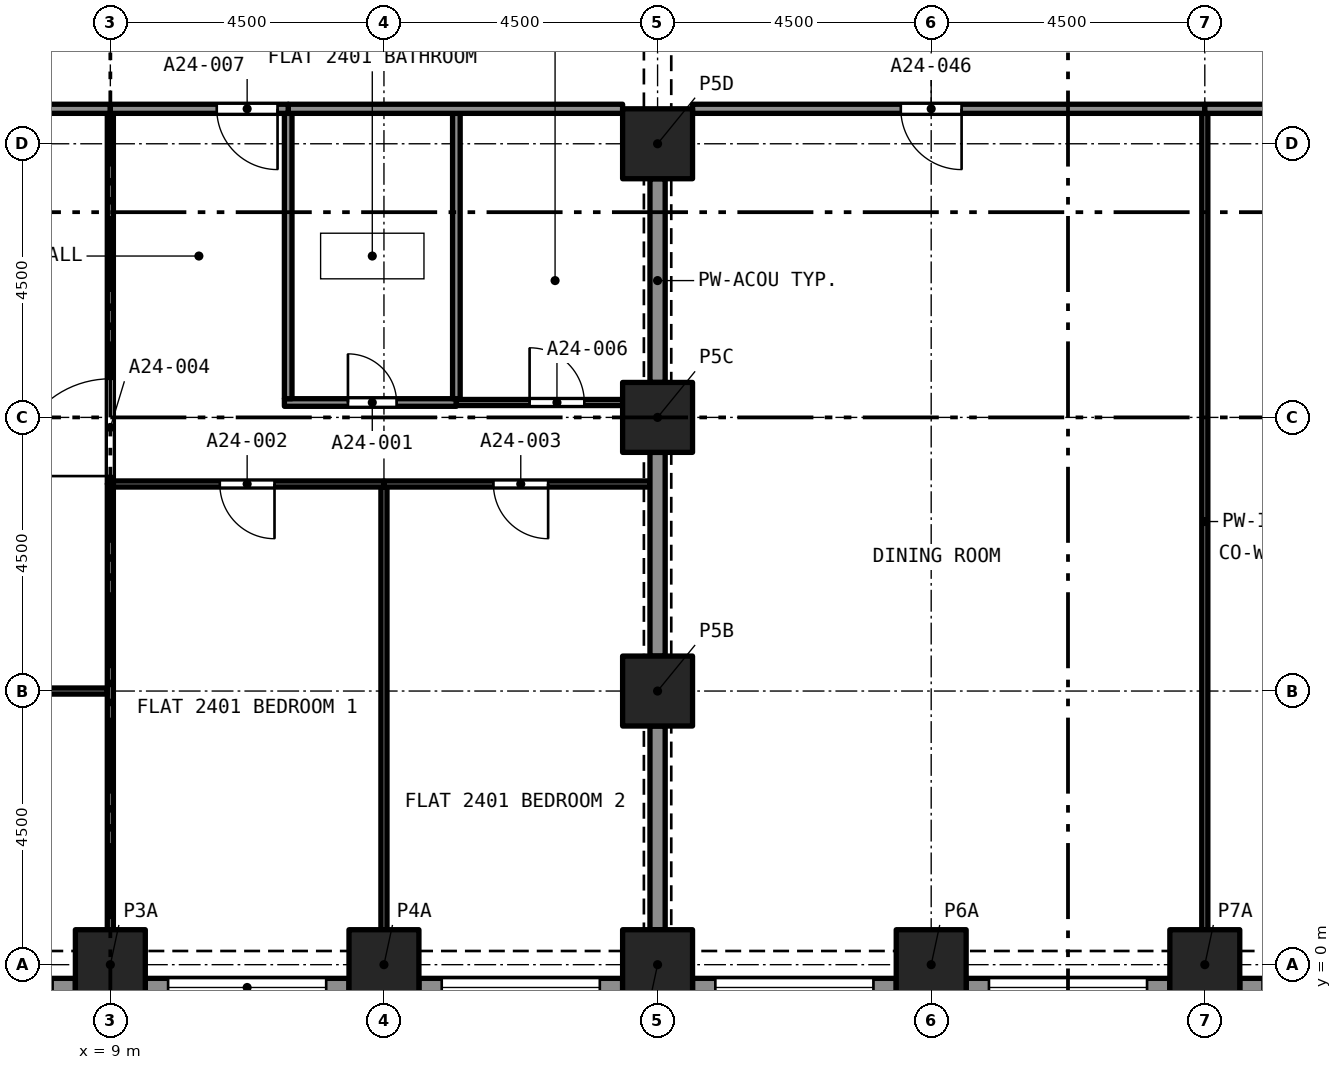
"""IFC4 building model, lengths in metres.
Left out: names, types, materials, properties, quantities, classifications, styles, units other than length and angle.
Written with IfcOpenShell. Run it as: python <this file> out.ifc"""

import sys

from ifc_helpers import new_model, si_unit, direction, frame, frame_2d, origin, origin_2d, place, context, subcontext, project, spatial, rectangle, extrude, element, fill, save


model = new_model("IFC4")
c1 = context("Model", 3, precision=1e-05, world=origin(), true_north=direction((0.0, 1.0)))
c2 = subcontext(c1, "Body", "Model", "MODEL_VIEW")
j1 = project(units=[si_unit("LENGTHUNIT", "METRE"), si_unit("PLANEANGLEUNIT", "RADIAN")], contexts=[c1])
p1 = place(None, origin())
s1 = spatial("IfcSite", under=j1, at=p1, CompositionType="ELEMENT")
p2 = place(p1, origin())
s2 = spatial("IfcBuilding", under=s1, at=p2, CompositionType="ELEMENT")
p3 = place(p2, frame((0.0, 0.0, 89.6)))
s3 = spatial("IfcBuildingStorey", under=s2, at=p3, CompositionType="ELEMENT", Elevation=89.6)
for number, where, z_axis, x_axis in (
    (1, (9.0, 0.0, 0.0), (0.0, 0.0, 1.0), (1.0, 0.0, 0.0)),
    (2, (13.5, 0.0, 0.0), (0.0, 0.0, 1.0), (1.0, 0.0, 0.0)),
    (3, (18.0, 0.0, 0.0), (0.0, 0.0, 1.0), (1.0, 0.0, 0.0)),
    (4, (22.5, 0.0, 0.0), (0.0, 0.0, 1.0), (1.0, 0.0, 0.0)),
    (5, (27.0, 0.0, 0.0), (0.0, 0.0, 1.0), (1.0, 0.0, 0.0)),
    (6, (18.0, 4.5, 0.0), (0.0, 0.0, 1.0), (1.0, 0.0, 0.0)),
    (7, (18.0, 9.0, 0.0), (0.0, 0.0, 1.0), (1.0, 0.0, 0.0)),
    (8, (18.0, 13.5, 0.0), (0.0, 0.0, 1.0), (1.0, 0.0, 0.0)),
):
    element("IfcColumn", number, at=place(p3, frame(where, z_axis=z_axis, x_axis=x_axis)), inside=s3, PredefinedType="COLUMN", context=c2, shape_type="SweptSolid", body=[
        extrude(rectangle(XDim=1.15, YDim=1.15, at=origin_2d()), origin(), (0.0, 0.0, 1.0), 3.2),
    ])
p4 = place(p3, frame((8.425, -0.375, 0.0), z_axis=(0.0, 0.0, 1.0), x_axis=(-1.0, 0.0, 0.0)))
e9 = element("IfcWall", 9, at=p4, inside=s3, PredefinedType="SOLIDWALL", context=c2, shape_type="SweptSolid", body=[
    extrude(rectangle(XDim=3.35, YDim=0.3, at=frame_2d((1.675, 0.0))), origin(), (0.0, 0.0, 1.0), 3.2),
])
p5 = place(p4, frame((0.375, 0.0, 0.45)))
e10 = element("IfcOpeningElement", 10, at=p5, cuts=e9, PredefinedType="OPENING", context=c2, shape_type="SweptSolid", body=[
    extrude(rectangle(XDim=2.6, YDim=1.95, at=frame_2d((1.3, 0.975))), frame((0.0, 0.16, 0.0), z_axis=(0.0, -1.0, 0.0), x_axis=(1.0, 0.0, 0.0)), (0.0, 0.0, 1.0), 0.32),
])
p6 = place(p3, frame((12.925, -0.375, 0.0), z_axis=(0.0, 0.0, 1.0), x_axis=(-1.0, 0.0, 0.0)))
e11 = element("IfcWall", 11, at=p6, inside=s3, PredefinedType="SOLIDWALL", context=c2, shape_type="SweptSolid", body=[
    extrude(rectangle(XDim=3.35, YDim=0.3, at=frame_2d((1.675, 0.0))), origin(), (0.0, 0.0, 1.0), 3.2),
])
p7 = place(p6, frame((0.375, 0.0, 0.45)))
e12 = element("IfcOpeningElement", 12, at=p7, cuts=e11, PredefinedType="OPENING", context=c2, shape_type="SweptSolid", body=[
    extrude(rectangle(XDim=2.6, YDim=1.95, at=frame_2d((1.3, 0.975))), frame((0.0, 0.16, 0.0), z_axis=(0.0, -1.0, 0.0), x_axis=(1.0, 0.0, 0.0)), (0.0, 0.0, 1.0), 0.32),
])
p8 = place(p3, frame((17.425, -0.375, 0.0), z_axis=(0.0, 0.0, 1.0), x_axis=(-1.0, 0.0, 0.0)))
e13 = element("IfcWall", 13, at=p8, inside=s3, PredefinedType="SOLIDWALL", context=c2, shape_type="SweptSolid", body=[
    extrude(rectangle(XDim=3.35, YDim=0.3, at=frame_2d((1.675, 0.0))), origin(), (0.0, 0.0, 1.0), 3.2),
])
p9 = place(p8, frame((0.375, 0.0, 0.45)))
e14 = element("IfcOpeningElement", 14, at=p9, cuts=e13, PredefinedType="OPENING", context=c2, shape_type="SweptSolid", body=[
    extrude(rectangle(XDim=2.6, YDim=1.95, at=frame_2d((1.3, 0.975))), frame((0.0, 0.16, 0.0), z_axis=(0.0, -1.0, 0.0), x_axis=(1.0, 0.0, 0.0)), (0.0, 0.0, 1.0), 0.32),
])
p10 = place(p3, frame((21.925, -0.375, 0.0), z_axis=(0.0, 0.0, 1.0), x_axis=(-1.0, 0.0, 0.0)))
e15 = element("IfcWall", 15, at=p10, inside=s3, PredefinedType="SOLIDWALL", context=c2, shape_type="SweptSolid", body=[
    extrude(rectangle(XDim=3.35, YDim=0.3, at=frame_2d((1.675, 0.0))), origin(), (0.0, 0.0, 1.0), 3.2),
])
p11 = place(p10, frame((0.375, 0.0, 0.45)))
e16 = element("IfcOpeningElement", 16, at=p11, cuts=e15, PredefinedType="OPENING", context=c2, shape_type="SweptSolid", body=[
    extrude(rectangle(XDim=2.6, YDim=1.95, at=frame_2d((1.3, 0.975))), frame((0.0, 0.16, 0.0), z_axis=(0.0, -1.0, 0.0), x_axis=(1.0, 0.0, 0.0)), (0.0, 0.0, 1.0), 0.32),
])
p12 = place(p3, frame((26.425, -0.375, 0.0), z_axis=(0.0, 0.0, 1.0), x_axis=(-1.0, 0.0, 0.0)))
e17 = element("IfcWall", 17, at=p12, inside=s3, PredefinedType="SOLIDWALL", context=c2, shape_type="SweptSolid", body=[
    extrude(rectangle(XDim=3.35, YDim=0.3, at=frame_2d((1.675, 0.0))), origin(), (0.0, 0.0, 1.0), 3.2),
])
p13 = place(p12, frame((0.375, 0.0, 0.45)))
e18 = element("IfcOpeningElement", 18, at=p13, cuts=e17, PredefinedType="OPENING", context=c2, shape_type="SweptSolid", body=[
    extrude(rectangle(XDim=2.6, YDim=1.95, at=frame_2d((1.3, 0.975))), frame((0.0, 0.16, 0.0), z_axis=(0.0, -1.0, 0.0), x_axis=(1.0, 0.0, 0.0)), (0.0, 0.0, 1.0), 0.32),
])
p14 = place(p3, frame((30.925, -0.375, 0.0), z_axis=(0.0, 0.0, 1.0), x_axis=(-1.0, 0.0, 0.0)))
e19 = element("IfcWall", 19, at=p14, inside=s3, PredefinedType="SOLIDWALL", context=c2, shape_type="SweptSolid", body=[
    extrude(rectangle(XDim=3.35, YDim=0.3, at=frame_2d((1.675, 0.0))), origin(), (0.0, 0.0, 1.0), 3.2),
])
p15 = place(p14, frame((0.375, 0.0, 0.45)))
e20 = element("IfcOpeningElement", 20, at=p15, cuts=e19, PredefinedType="OPENING", context=c2, shape_type="SweptSolid", body=[
    extrude(rectangle(XDim=2.6, YDim=1.95, at=frame_2d((1.3, 0.975))), frame((0.0, 0.16, 0.0), z_axis=(0.0, -1.0, 0.0), x_axis=(1.0, 0.0, 0.0)), (0.0, 0.0, 1.0), 0.32),
])
p16 = place(p3, frame((11.863, 9.245, 0.0), z_axis=(0.0, 0.0, 1.0), x_axis=(1.0, 0.0, 0.0)))
e21 = element("IfcWall", 21, at=p16, inside=s3, PredefinedType="PARTITIONING", context=c2, shape_type="SweptSolid", body=[
    extrude(rectangle(XDim=2.828, YDim=0.125, at=frame_2d((1.414, 0.0))), origin(), (0.0, 0.0, 1.0), 2.9),
])
p17 = place(p16, frame((1.045, 0.0, 0.0)))
e22 = element("IfcOpeningElement", 22, at=p17, cuts=e21, PredefinedType="OPENING", context=c2, shape_type="SweptSolid", body=[
    extrude(rectangle(XDim=0.8, YDim=2.1, at=frame_2d((0.4, 1.05))), frame((0.0, 0.073, 0.0), z_axis=(0.0, -1.0, 0.0), x_axis=(1.0, 0.0, 0.0)), (0.0, 0.0, 1.0), 0.145),
])
for number, where, z_axis, x_axis in (
    (23, (11.925, 9.308, 0.0), (0.0, 0.0, 1.0), (0.0, 1.0, 0.0)),
    (24, (14.691, 9.308, 0.0), (0.0, 0.0, 1.0), (0.0, 1.0, 0.0)),
):
    element("IfcWall", number, at=place(p3, frame(where, z_axis=z_axis, x_axis=x_axis)), inside=s3, PredefinedType="PARTITIONING", context=c2, shape_type="SweptSolid", body=[
        extrude(rectangle(XDim=4.692, YDim=0.125, at=frame_2d((2.346, 0.0))), origin(), (0.0, 0.0, 1.0), 2.9),
    ])
p18 = place(p3, frame((11.925, 14.075, 0.0), z_axis=(0.0, 0.0, 1.0), x_axis=(1.0, 0.0, 0.0)))
e25 = element("IfcWall", 25, at=p18, inside=s3, PredefinedType="PARTITIONING", context=c2, shape_type="SweptSolid", body=[
    extrude(rectangle(XDim=5.5, YDim=0.15, at=frame_2d((2.75, 0.0))), origin(), (0.0, 0.0, 1.0), 2.9),
])
p19 = place(p3, frame((13.5, 0.575, 0.0), z_axis=(0.0, 0.0, 1.0), x_axis=(0.0, 1.0, 0.0)))
e26 = element("IfcWall", 26, at=p19, inside=s3, PredefinedType="PARTITIONING", context=c2, shape_type="SweptSolid", body=[
    extrude(rectangle(XDim=7.28, YDim=0.1, at=frame_2d((3.64, 0.0))), origin(), (0.0, 0.0, 1.0), 2.9),
])
p20 = place(p3, frame((13.5, 7.905, 0.0), z_axis=(0.0, 0.0, 1.0), x_axis=(-1.0, 0.0, 0.0)))
e27 = element("IfcWall", 27, at=p20, inside=s3, PredefinedType="PARTITIONING", context=c2, shape_type="SweptSolid", body=[
    extrude(rectangle(XDim=4.45, YDim=0.1, at=frame_2d((2.225, 0.0))), origin(), (0.0, 0.0, 1.0), 2.9),
])
p21 = place(p20, frame((1.8, 0.0, 0.0)))
e28 = element("IfcOpeningElement", 28, at=p21, cuts=e27, PredefinedType="OPENING", context=c2, shape_type="SweptSolid", body=[
    extrude(rectangle(XDim=0.9, YDim=2.1, at=frame_2d((0.45, 1.05))), frame((0.0, 0.06, 0.0), z_axis=(0.0, -1.0, 0.0), x_axis=(1.0, 0.0, 0.0)), (0.0, 0.0, 1.0), 0.12),
])
p22 = place(p3, frame((9.0, 0.575, 0.0), z_axis=(0.0, 0.0, 1.0), x_axis=(0.0, 1.0, 0.0)))
e29 = element("IfcWall", 29, at=p22, inside=s3, PredefinedType="PARTITIONING", context=c2, shape_type="SweptSolid", body=[
    extrude(rectangle(XDim=7.33, YDim=0.1, at=frame_2d((3.665, 0.0))), origin(), (0.0, 0.0, 1.0), 2.9),
])
p23 = place(p3, frame((17.875, 7.905, 0.0), z_axis=(0.0, 0.0, 1.0), x_axis=(-1.0, 0.0, 0.0)))
e30 = element("IfcWall", 30, at=p23, inside=s3, PredefinedType="PARTITIONING", context=c2, shape_type="SweptSolid", body=[
    extrude(rectangle(XDim=4.375, YDim=0.1, at=frame_2d((2.188, 0.0))), origin(), (0.0, 0.0, 1.0), 2.9),
])
p24 = place(p23, frame((1.675, 0.0, 0.0)))
e31 = element("IfcOpeningElement", 31, at=p24, cuts=e30, PredefinedType="OPENING", context=c2, shape_type="SweptSolid", body=[
    extrude(rectangle(XDim=0.9, YDim=2.1, at=frame_2d((0.45, 1.05))), frame((0.0, 0.06, 0.0), z_axis=(0.0, -1.0, 0.0), x_axis=(1.0, 0.0, 0.0)), (0.0, 0.0, 1.0), 0.12),
])
for number, where, z_axis, x_axis in (
    (32, (18.0, 5.075, 0.0), (0.0, 0.0, 1.0), (0.0, 1.0, 0.0)),
    (33, (18.0, 0.575, 0.0), (0.0, 0.0, 1.0), (0.0, 1.0, 0.0)),
):
    element("IfcWall", number, at=place(p3, frame(where, z_axis=z_axis, x_axis=x_axis)), inside=s3, PredefinedType="PARTITIONING", context=c2, shape_type="SweptSolid", body=[
        extrude(rectangle(XDim=3.35, YDim=0.25, at=frame_2d((1.675, 0.0))), origin(), (0.0, 0.0, 1.0), 2.38),
    ])
p25 = place(p3, frame((9.0, 7.905, 0.0), z_axis=(0.0, 0.0, 1.0), x_axis=(0.0, 1.0, 0.0)))
e34 = element("IfcWall", 34, at=p25, inside=s3, PredefinedType="PARTITIONING", context=c2, shape_type="SweptSolid", body=[
    extrude(rectangle(XDim=6.095, YDim=0.1, at=frame_2d((3.047, 0.0))), origin(), (0.0, 0.0, 1.0), 2.9),
])
p26 = place(p25, frame((0.13, 0.0, 0.0)))
e35 = element("IfcOpeningElement", 35, at=p26, cuts=e34, PredefinedType="OPENING", context=c2, shape_type="SweptSolid", body=[
    extrude(rectangle(XDim=1.6, YDim=2.1, at=frame_2d((0.8, 1.05))), frame((0.0, 0.06, 0.0), z_axis=(0.0, -1.0, 0.0), x_axis=(1.0, 0.0, 0.0)), (0.0, 0.0, 1.0), 0.12),
])
p27 = place(p3, frame((0.622, 4.5, 0.0), z_axis=(0.0, 0.0, 1.0), x_axis=(1.0, 0.0, 0.0)))
e36 = element("IfcWall", 36, at=p27, inside=s3, PredefinedType="PARTITIONING", context=c2, shape_type="SweptSolid", body=[
    extrude(rectangle(XDim=8.328, YDim=0.1, at=frame_2d((4.164, 0.0))), origin(), (0.0, 0.0, 1.0), 2.9),
])
p28 = place(p27, frame((3.365, 0.0, 0.0)))
e37 = element("IfcOpeningElement", 37, at=p28, cuts=e36, PredefinedType="OPENING", context=c2, shape_type="SweptSolid", body=[
    extrude(rectangle(XDim=1.6, YDim=2.1, at=frame_2d((0.8, 1.05))), frame((0.0, 0.06, 0.0), z_axis=(0.0, -1.0, 0.0), x_axis=(1.0, 0.0, 0.0)), (0.0, 0.0, 1.0), 0.12),
])
p29 = place(p3, frame((0.575, 14.075, 0.0), z_axis=(0.0, 0.0, 1.0), x_axis=(1.0, 0.0, 0.0)))
e38 = element("IfcWall", 38, at=p29, inside=s3, PredefinedType="PARTITIONING", context=c2, shape_type="SweptSolid", body=[
    extrude(rectangle(XDim=8.425, YDim=0.15, at=frame_2d((4.212, 0.0))), origin(), (0.0, 0.0, 1.0), 2.9),
])
p30 = place(p3, frame((14.69, 9.245, 0.0), z_axis=(0.0, 0.0, 1.0), x_axis=(1.0, 0.0, 0.0)))
e39 = element("IfcWall", 39, at=p30, inside=s3, PredefinedType="PARTITIONING", context=c2, shape_type="SweptSolid", body=[
    extrude(rectangle(XDim=2.735, YDim=0.1, at=frame_2d((1.367, 0.0))), origin(), (0.0, 0.0, 1.0), 2.9),
])
p31 = place(p30, frame((1.205, 0.0, 0.0)))
e40 = element("IfcOpeningElement", 40, at=p31, cuts=e39, PredefinedType="OPENING", context=c2, shape_type="SweptSolid", body=[
    extrude(rectangle(XDim=0.9, YDim=2.1, at=frame_2d((0.45, 1.05))), frame((0.0, 0.06, 0.0), z_axis=(0.0, -1.0, 0.0), x_axis=(1.0, 0.0, 0.0)), (0.0, 0.0, 1.0), 0.12),
])
p32 = place(p3, frame((11.925, 14.075, 0.0), z_axis=(0.0, 0.0, 1.0), x_axis=(-1.0, 0.0, 0.0)))
e41 = element("IfcWall", 41, at=p32, inside=s3, PredefinedType="PARTITIONING", context=c2, shape_type="SweptSolid", body=[
    extrude(rectangle(XDim=2.925, YDim=0.15, at=frame_2d((1.462, 0.0))), origin(), (0.0, 0.0, 1.0), 2.9),
])
p33 = place(p32, frame((0.175, 0.0, 0.0)))
e42 = element("IfcOpeningElement", 42, at=p33, cuts=e41, PredefinedType="OPENING", context=c2, shape_type="SweptSolid", body=[
    extrude(rectangle(XDim=1.0, YDim=2.1, at=frame_2d((0.5, 1.05))), frame((0.0, 0.085, 0.0), z_axis=(0.0, -1.0, 0.0), x_axis=(1.0, 0.0, 0.0)), (0.0, 0.0, 1.0), 0.17),
])
p34 = place(p3, frame((18.0, 9.575, 0.0), z_axis=(0.0, 0.0, 1.0), x_axis=(0.0, 1.0, 0.0)))
e43 = element("IfcWall", 43, at=p34, inside=s3, PredefinedType="PARTITIONING", context=c2, shape_type="SweptSolid", body=[
    extrude(rectangle(XDim=3.35, YDim=0.25, at=frame_2d((1.675, 0.0))), origin(), (0.0, 0.0, 1.0), 2.38),
])
p35 = place(p3, frame((27.0, 0.575, 0.0), z_axis=(0.0, 0.0, 1.0), x_axis=(0.0, 1.0, 0.0)))
e44 = element("IfcWall", 44, at=p35, inside=s3, PredefinedType="PARTITIONING", context=c2, shape_type="SweptSolid", body=[
    extrude(rectangle(XDim=13.425, YDim=0.1, at=frame_2d((6.712, 0.0))), origin(), (0.0, 0.0, 1.0), 2.75),
])
p36 = place(p3, frame((27.0, 14.075, 0.0), z_axis=(0.0, 0.0, 1.0), x_axis=(-1.0, 0.0, 0.0)))
e45 = element("IfcWall", 45, at=p36, inside=s3, PredefinedType="PARTITIONING", context=c2, shape_type="SweptSolid", body=[
    extrude(rectangle(XDim=8.425, YDim=0.15, at=frame_2d((4.212, 0.0))), origin(), (0.0, 0.0, 1.0), 2.75),
])
p37 = place(p36, frame((4.0, 0.0, 0.0)))
e46 = element("IfcOpeningElement", 46, at=p37, cuts=e45, PredefinedType="OPENING", context=c2, shape_type="SweptSolid", body=[
    extrude(rectangle(XDim=1.0, YDim=2.1, at=frame_2d((0.5, 1.05))), frame((0.0, 0.085, 0.0), z_axis=(0.0, -1.0, 0.0), x_axis=(1.0, 0.0, 0.0)), (0.0, 0.0, 1.0), 0.17),
])
p38 = place(p3, frame((30.925, 14.075, 0.0), z_axis=(0.0, 0.0, 1.0), x_axis=(-1.0, 0.0, 0.0)))
e47 = element("IfcWall", 47, at=p38, inside=s3, PredefinedType="PARTITIONING", context=c2, shape_type="SweptSolid", body=[
    extrude(rectangle(XDim=3.925, YDim=0.15, at=frame_2d((1.962, 0.0))), origin(), (0.0, 0.0, 1.0), 2.75),
])
p39 = place(p38, frame((1.175, 0.0, 0.0)))
e48 = element("IfcOpeningElement", 48, at=p39, cuts=e47, PredefinedType="OPENING", context=c2, shape_type="SweptSolid", body=[
    extrude(rectangle(XDim=1.0, YDim=2.1, at=frame_2d((0.5, 1.05))), frame((0.0, 0.085, 0.0), z_axis=(0.0, -1.0, 0.0), x_axis=(1.0, 0.0, 0.0)), (0.0, 0.0, 1.0), 0.17),
])
p40 = place(p7, origin())
e49 = element("IfcWindow", 49, at=p40, inside=s3, PartitioningType="SINGLE_PANEL", PredefinedType="WINDOW", context=c2, shape_type="SweptSolid", body=[
    extrude(rectangle(XDim=2.6, YDim=1.95, at=frame_2d((1.3, 0.975))), frame((0.0, 0.03, 0.0), z_axis=(0.0, -1.0, 0.0), x_axis=(1.0, 0.0, 0.0)), (0.0, 0.0, 1.0), 0.06),
])
fill(e12, e49)
p41 = place(p9, origin())
e50 = element("IfcWindow", 50, at=p41, inside=s3, PartitioningType="SINGLE_PANEL", PredefinedType="WINDOW", context=c2, shape_type="SweptSolid", body=[
    extrude(rectangle(XDim=2.6, YDim=1.95, at=frame_2d((1.3, 0.975))), frame((0.0, 0.03, 0.0), z_axis=(0.0, -1.0, 0.0), x_axis=(1.0, 0.0, 0.0)), (0.0, 0.0, 1.0), 0.06),
])
fill(e14, e50)
p42 = place(p11, origin())
e51 = element("IfcWindow", 51, at=p42, inside=s3, PartitioningType="SINGLE_PANEL", PredefinedType="WINDOW", context=c2, shape_type="SweptSolid", body=[
    extrude(rectangle(XDim=2.6, YDim=1.95, at=frame_2d((1.3, 0.975))), frame((0.0, 0.03, 0.0), z_axis=(0.0, -1.0, 0.0), x_axis=(1.0, 0.0, 0.0)), (0.0, 0.0, 1.0), 0.06),
])
fill(e16, e51)
p43 = place(p13, origin())
e52 = element("IfcWindow", 52, at=p43, inside=s3, PartitioningType="SINGLE_PANEL", PredefinedType="WINDOW", context=c2, shape_type="SweptSolid", body=[
    extrude(rectangle(XDim=2.6, YDim=1.95, at=frame_2d((1.3, 0.975))), frame((0.0, 0.03, 0.0), z_axis=(0.0, -1.0, 0.0), x_axis=(1.0, 0.0, 0.0)), (0.0, 0.0, 1.0), 0.06),
])
fill(e18, e52)
p44 = place(p17, origin())
e53 = element("IfcDoor", 53, at=p44, inside=s3, OperationType="SINGLE_SWING_RIGHT", PredefinedType="DOOR", context=c2, shape_type="SweptSolid", body=[
    extrude(rectangle(XDim=0.8, YDim=2.1, at=frame_2d((0.4, 1.05))), frame((0.0, 0.025, 0.0), z_axis=(0.0, -1.0, 0.0), x_axis=(1.0, 0.0, 0.0)), (0.0, 0.0, 1.0), 0.05),
])
fill(e22, e53)
p45 = place(p21, origin())
e54 = element("IfcDoor", 54, at=p45, inside=s3, OperationType="SINGLE_SWING_RIGHT", PredefinedType="DOOR", context=c2, shape_type="SweptSolid", body=[
    extrude(rectangle(XDim=0.9, YDim=2.1, at=frame_2d((0.45, 1.05))), frame((0.0, 0.025, 0.0), z_axis=(0.0, -1.0, 0.0), x_axis=(1.0, 0.0, 0.0)), (0.0, 0.0, 1.0), 0.05),
])
fill(e28, e54)
p46 = place(p24, origin())
e55 = element("IfcDoor", 55, at=p46, inside=s3, OperationType="SINGLE_SWING_LEFT", PredefinedType="DOOR", context=c2, shape_type="SweptSolid", body=[
    extrude(rectangle(XDim=0.9, YDim=2.1, at=frame_2d((0.45, 1.05))), frame((0.0, 0.025, 0.0), z_axis=(0.0, -1.0, 0.0), x_axis=(1.0, 0.0, 0.0)), (0.0, 0.0, 1.0), 0.05),
])
fill(e31, e55)
p47 = place(p26, origin())
e56 = element("IfcDoor", 56, at=p47, inside=s3, OperationType="SINGLE_SWING_LEFT", PredefinedType="DOOR", context=c2, shape_type="SweptSolid", body=[
    extrude(rectangle(XDim=1.6, YDim=2.1, at=frame_2d((0.8, 1.05))), frame((0.0, 0.025, 0.0), z_axis=(0.0, -1.0, 0.0), x_axis=(1.0, 0.0, 0.0)), (0.0, 0.0, 1.0), 0.05),
])
fill(e35, e56)
p48 = place(p31, origin())
e57 = element("IfcDoor", 57, at=p48, inside=s3, OperationType="SINGLE_SWING_RIGHT", PredefinedType="DOOR", context=c2, shape_type="SweptSolid", body=[
    extrude(rectangle(XDim=0.9, YDim=2.1, at=frame_2d((0.45, 1.05))), frame((0.0, 0.025, 0.0), z_axis=(0.0, -1.0, 0.0), x_axis=(1.0, 0.0, 0.0)), (0.0, 0.0, 1.0), 0.05),
])
fill(e40, e57)
p49 = place(p33, origin())
e58 = element("IfcDoor", 58, at=p49, inside=s3, OperationType="SINGLE_SWING_LEFT", PredefinedType="DOOR", context=c2, shape_type="SweptSolid", body=[
    extrude(rectangle(XDim=1.0, YDim=2.1, at=frame_2d((0.5, 1.05))), frame((0.0, 0.025, 0.0), z_axis=(0.0, -1.0, 0.0), x_axis=(1.0, 0.0, 0.0)), (0.0, 0.0, 1.0), 0.05),
])
fill(e42, e58)
p50 = place(p37, origin())
e59 = element("IfcDoor", 59, at=p50, inside=s3, OperationType="SINGLE_SWING_RIGHT", PredefinedType="DOOR", context=c2, shape_type="SweptSolid", body=[
    extrude(rectangle(XDim=1.0, YDim=2.1, at=frame_2d((0.5, 1.05))), frame((0.0, 0.025, 0.0), z_axis=(0.0, -1.0, 0.0), x_axis=(1.0, 0.0, 0.0)), (0.0, 0.0, 1.0), 0.05),
])
fill(e46, e59)
save(model, sys.argv[1])
